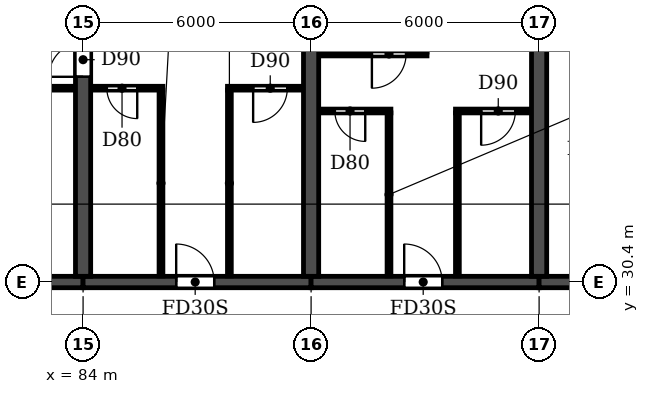
"""IFC4 building model, lengths in metres.
Left out: names, types, materials, properties, quantities, classifications, styles, units other than length and angle.
Written with IfcOpenShell. Run it as: python <this file> out.ifc"""

import sys

from ifc_helpers import new_model, si_unit, direction, frame, frame_2d, origin, place, context, subcontext, project, spatial, rectangle, extrude, element, fill, save


model = new_model("IFC4")
c1 = context("Model", 3, precision=1e-05, world=origin(), true_north=direction((0.0, 1.0)))
c2 = subcontext(c1, "Body", "Model", "MODEL_VIEW")
j1 = project(units=[si_unit("LENGTHUNIT", "METRE"), si_unit("PLANEANGLEUNIT", "RADIAN")], contexts=[c1])
p1 = place(None, origin())
s1 = spatial("IfcSite", under=j1, at=p1, CompositionType="ELEMENT")
p2 = place(p1, origin())
s2 = spatial("IfcBuilding", under=s1, at=p2, CompositionType="ELEMENT")
p3 = place(p2, frame((0.0, 0.0, 43.2)))
s3 = spatial("IfcBuildingStorey", under=s2, at=p3, CompositionType="ELEMENT", Elevation=43.2)
p4 = place(p3, frame((84.0, 30.55, 0.0), z_axis=(0.0, 0.0, 1.0), x_axis=(0.0, 1.0, 0.0)))
e1 = element("IfcWall", 1, at=p4, inside=s3, PredefinedType="SHEAR", context=c2, shape_type="SweptSolid", body=[
    extrude(rectangle(XDim=14.05, YDim=0.4, at=frame_2d((7.025, 0.0))), origin(), (0.0, 0.0, 1.0), 3.05),
])
p5 = place(p4, frame((5.25, 0.0, 0.0)))
e2 = element("IfcOpeningElement", 2, at=p5, cuts=e1, PredefinedType="OPENING", context=c2, shape_type="SweptSolid", body=[
    extrude(rectangle(XDim=0.9, YDim=2.1, at=frame_2d((0.45, 1.05))), frame((0.0, 0.21, 0.0), z_axis=(0.0, -1.0, 0.0), x_axis=(1.0, 0.0, 0.0)), (0.0, 0.0, 1.0), 0.42),
])
for number, where, z_axis, x_axis in (
    (3, (90.0, 30.55, 0.0), (0.0, 0.0, 1.0), (0.0, 1.0, 0.0)),
    (4, (96.0, 30.55, 0.0), (0.0, 0.0, 1.0), (0.0, 1.0, 0.0)),
):
    element("IfcWall", number, at=place(p3, frame(where, z_axis=z_axis, x_axis=x_axis)), inside=s3, PredefinedType="SHEAR", context=c2, shape_type="SweptSolid", body=[
        extrude(rectangle(XDim=14.05, YDim=0.4, at=frame_2d((7.025, 0.0))), origin(), (0.0, 0.0, 1.0), 3.05),
    ])
p6 = place(p3, frame((78.0, 30.4, 0.0), z_axis=(0.0, 0.0, 1.0), x_axis=(1.0, 0.0, 0.0)))
e5 = element("IfcWall", 5, at=p6, inside=s3, PredefinedType="SHEAR", context=c2, shape_type="SweptSolid", body=[
    extrude(rectangle(XDim=6.0, YDim=0.3, at=frame_2d((3.0, 0.0))), origin(), (0.0, 0.0, 1.0), 2.45),
])
p7 = place(p3, frame((84.0, 30.4, 0.0), z_axis=(0.0, 0.0, 1.0), x_axis=(1.0, 0.0, 0.0)))
e6 = element("IfcWall", 6, at=p7, inside=s3, PredefinedType="SHEAR", context=c2, shape_type="SweptSolid", body=[
    extrude(rectangle(XDim=6.0, YDim=0.3, at=frame_2d((3.0, 0.0))), origin(), (0.0, 0.0, 1.0), 2.45),
])
p8 = place(p7, frame((2.45, 0.0, 0.0)))
e7 = element("IfcOpeningElement", 7, at=p8, cuts=e6, PredefinedType="OPENING", context=c2, shape_type="SweptSolid", body=[
    extrude(rectangle(XDim=1.0, YDim=2.1, at=frame_2d((0.5, 1.05))), frame((0.0, 0.16, 0.0), z_axis=(0.0, -1.0, 0.0), x_axis=(1.0, 0.0, 0.0)), (0.0, 0.0, 1.0), 0.32),
])
p9 = place(p3, frame((90.0, 30.4, 0.0), z_axis=(0.0, 0.0, 1.0), x_axis=(1.0, 0.0, 0.0)))
e8 = element("IfcWall", 8, at=p9, inside=s3, PredefinedType="SHEAR", context=c2, shape_type="SweptSolid", body=[
    extrude(rectangle(XDim=6.0, YDim=0.3, at=frame_2d((3.0, 0.0))), origin(), (0.0, 0.0, 1.0), 2.45),
])
p10 = place(p9, frame((2.45, 0.0, 0.0)))
e9 = element("IfcOpeningElement", 9, at=p10, cuts=e8, PredefinedType="OPENING", context=c2, shape_type="SweptSolid", body=[
    extrude(rectangle(XDim=1.0, YDim=2.1, at=frame_2d((0.5, 1.05))), frame((0.0, 0.16, 0.0), z_axis=(0.0, -1.0, 0.0), x_axis=(1.0, 0.0, 0.0)), (0.0, 0.0, 1.0), 0.32),
])
p11 = place(p3, frame((96.0, 30.4, 0.0), z_axis=(0.0, 0.0, 1.0), x_axis=(1.0, 0.0, 0.0)))
e10 = element("IfcWall", 10, at=p11, inside=s3, PredefinedType="SHEAR", context=c2, shape_type="SweptSolid", body=[
    extrude(rectangle(XDim=5.8, YDim=0.3, at=frame_2d((2.9, 0.0))), origin(), (0.0, 0.0, 1.0), 2.45),
])
p12 = place(p11, frame((2.5, 0.0, 0.0)))
e11 = element("IfcOpeningElement", 11, at=p12, cuts=e10, PredefinedType="OPENING", context=c2, shape_type="SweptSolid", body=[
    extrude(rectangle(XDim=1.0, YDim=2.1, at=frame_2d((0.5, 1.05))), frame((0.0, 0.16, 0.0), z_axis=(0.0, -1.0, 0.0), x_axis=(1.0, 0.0, 0.0)), (0.0, 0.0, 1.0), 0.32),
])
p13 = place(p3, frame((90.21, 34.9, 0.0), z_axis=(0.0, 0.0, 1.0), x_axis=(1.0, 0.0, 0.0)))
e12 = element("IfcWall", 12, at=p13, inside=s3, PredefinedType="PARTITIONING", context=c2, shape_type="SweptSolid", body=[
    extrude(rectangle(XDim=1.89, YDim=0.1, at=frame_2d((0.945, 0.0))), origin(), (0.0, 0.0, 1.0), 3.05),
])
p14 = place(p13, frame((0.415, 0.0, 0.0)))
e13 = element("IfcOpeningElement", 13, at=p14, cuts=e12, PredefinedType="OPENING", context=c2, shape_type="SweptSolid", body=[
    extrude(rectangle(XDim=0.8, YDim=2.1, at=frame_2d((0.4, 1.05))), frame((0.0, 0.06, 0.0), z_axis=(0.0, -1.0, 0.0), x_axis=(1.0, 0.0, 0.0)), (0.0, 0.0, 1.0), 0.12),
])
p15 = place(p3, frame((93.8, 34.9, 0.0), z_axis=(0.0, 0.0, 1.0), x_axis=(1.0, 0.0, 0.0)))
e14 = element("IfcWall", 14, at=p15, inside=s3, PredefinedType="PARTITIONING", context=c2, shape_type="SweptSolid", body=[
    extrude(rectangle(XDim=1.99, YDim=0.1, at=frame_2d((0.995, 0.0))), origin(), (0.0, 0.0, 1.0), 3.05),
])
p16 = place(p15, frame((0.675, 0.0, 0.0)))
e15 = element("IfcOpeningElement", 15, at=p16, cuts=e14, PredefinedType="OPENING", context=c2, shape_type="SweptSolid", body=[
    extrude(rectangle(XDim=0.9, YDim=2.1, at=frame_2d((0.45, 1.05))), frame((0.0, 0.06, 0.0), z_axis=(0.0, -1.0, 0.0), x_axis=(1.0, 0.0, 0.0)), (0.0, 0.0, 1.0), 0.12),
])
p17 = place(p3, frame((81.1, 35.5, 0.0), z_axis=(0.0, 0.0, 1.0), x_axis=(1.0, 0.0, 0.0)))
e16 = element("IfcWall", 16, at=p17, inside=s3, PredefinedType="PARTITIONING", context=c2, shape_type="SweptSolid", body=[
    extrude(rectangle(XDim=2.69, YDim=0.1, at=frame_2d((1.345, 0.0))), origin(), (0.0, 0.0, 1.0), 3.05),
])
p18 = place(p17, frame((1.0, 0.0, 0.0)))
e17 = element("IfcOpeningElement", 17, at=p18, cuts=e16, PredefinedType="OPENING", context=c2, shape_type="SweptSolid", body=[
    extrude(rectangle(XDim=0.8, YDim=2.1, at=frame_2d((0.4, 1.05))), frame((0.0, 0.06, 0.0), z_axis=(0.0, -1.0, 0.0), x_axis=(1.0, 0.0, 0.0)), (0.0, 0.0, 1.0), 0.12),
])
p19 = place(p3, frame((84.21, 35.5, 0.0), z_axis=(0.0, 0.0, 1.0), x_axis=(1.0, 0.0, 0.0)))
e18 = element("IfcWall", 18, at=p19, inside=s3, PredefinedType="PARTITIONING", context=c2, shape_type="SweptSolid", body=[
    extrude(rectangle(XDim=1.89, YDim=0.1, at=frame_2d((0.945, 0.0))), origin(), (0.0, 0.0, 1.0), 3.05),
])
p20 = place(p19, frame((0.415, 0.0, 0.0)))
e19 = element("IfcOpeningElement", 19, at=p20, cuts=e18, PredefinedType="OPENING", context=c2, shape_type="SweptSolid", body=[
    extrude(rectangle(XDim=0.8, YDim=2.1, at=frame_2d((0.4, 1.05))), frame((0.0, 0.06, 0.0), z_axis=(0.0, -1.0, 0.0), x_axis=(1.0, 0.0, 0.0)), (0.0, 0.0, 1.0), 0.12),
])
p21 = place(p3, frame((87.8, 35.5, 0.0), z_axis=(0.0, 0.0, 1.0), x_axis=(1.0, 0.0, 0.0)))
e20 = element("IfcWall", 20, at=p21, inside=s3, PredefinedType="PARTITIONING", context=c2, shape_type="SweptSolid", body=[
    extrude(rectangle(XDim=1.99, YDim=0.1, at=frame_2d((0.995, 0.0))), origin(), (0.0, 0.0, 1.0), 3.05),
])
p22 = place(p21, frame((0.675, 0.0, 0.0)))
e21 = element("IfcOpeningElement", 21, at=p22, cuts=e20, PredefinedType="OPENING", context=c2, shape_type="SweptSolid", body=[
    extrude(rectangle(XDim=0.9, YDim=2.1, at=frame_2d((0.45, 1.05))), frame((0.0, 0.06, 0.0), z_axis=(0.0, -1.0, 0.0), x_axis=(1.0, 0.0, 0.0)), (0.0, 0.0, 1.0), 0.12),
])
p23 = place(p3, frame((90.21, 36.4, 0.0), z_axis=(0.0, 0.0, 1.0), x_axis=(1.0, 0.0, 0.0)))
e22 = element("IfcWall", 22, at=p23, inside=s3, PredefinedType="PARTITIONING", context=c2, shape_type="SweptSolid", body=[
    extrude(rectangle(XDim=2.84, YDim=0.1, at=frame_2d((1.42, 0.0))), origin(), (0.0, 0.0, 1.0), 3.05),
])
p24 = place(p23, frame((1.39, 0.0, 0.0)))
e23 = element("IfcOpeningElement", 23, at=p24, cuts=e22, PredefinedType="OPENING", context=c2, shape_type="SweptSolid", body=[
    extrude(rectangle(XDim=0.9, YDim=2.1, at=frame_2d((0.45, 1.05))), frame((0.0, 0.06, 0.0), z_axis=(0.0, -1.0, 0.0), x_axis=(1.0, 0.0, 0.0)), (0.0, 0.0, 1.0), 0.12),
])
for number, where, z_axis, x_axis in (
    (24, (86.05, 30.56, 0.0), (0.0, 0.0, 1.0), (0.0, 1.0, 0.0)),
    (25, (87.85, 30.56, 0.0), (0.0, 0.0, 1.0), (0.0, 1.0, 0.0)),
):
    element("IfcWall", number, at=place(p3, frame(where, z_axis=z_axis, x_axis=x_axis)), inside=s3, PredefinedType="PARTITIONING", context=c2, shape_type="SweptSolid", body=[
        extrude(rectangle(XDim=4.89, YDim=0.1, at=frame_2d((2.445, 0.0))), origin(), (0.0, 0.0, 1.0), 3.05),
    ])
for number, where, z_axis, x_axis in (
    (26, (92.05, 30.56, 0.0), (0.0, 0.0, 1.0), (0.0, 1.0, 0.0)),
    (27, (93.85, 30.56, 0.0), (0.0, 0.0, 1.0), (0.0, 1.0, 0.0)),
):
    element("IfcWall", number, at=place(p3, frame(where, z_axis=z_axis, x_axis=x_axis)), inside=s3, PredefinedType="PARTITIONING", context=c2, shape_type="SweptSolid", body=[
        extrude(rectangle(XDim=4.29, YDim=0.1, at=frame_2d((2.145, 0.0))), origin(), (0.0, 0.0, 1.0), 3.05),
    ])
p25 = place(p5, origin())
e28 = element("IfcDoor", 28, at=p25, inside=s3, OperationType="SINGLE_SWING_LEFT", PredefinedType="DOOR", context=c2, shape_type="SweptSolid", body=[
    extrude(rectangle(XDim=0.9, YDim=2.1, at=frame_2d((0.45, 1.05))), frame((0.0, 0.025, 0.0), z_axis=(0.0, -1.0, 0.0), x_axis=(1.0, 0.0, 0.0)), (0.0, 0.0, 1.0), 0.05),
])
fill(e2, e28)
p26 = place(p20, frame((0.8, 0.0, 0.0), z_axis=(0.0, 0.0, 1.0), x_axis=(-1.0, 0.0, 0.0)))
e29 = element("IfcDoor", 29, at=p26, inside=s3, OperationType="SINGLE_SWING_LEFT", PredefinedType="DOOR", context=c2, shape_type="SweptSolid", body=[
    extrude(rectangle(XDim=0.8, YDim=2.1, at=frame_2d((0.4, 1.05))), frame((0.0, 0.025, 0.0), z_axis=(0.0, -1.0, 0.0), x_axis=(1.0, 0.0, 0.0)), (0.0, 0.0, 1.0), 0.05),
])
fill(e19, e29)
p27 = place(p8, origin())
e30 = element("IfcDoor", 30, at=p27, inside=s3, OperationType="SINGLE_SWING_LEFT", PredefinedType="DOOR", context=c2, shape_type="SweptSolid", body=[
    extrude(rectangle(XDim=1.0, YDim=2.1, at=frame_2d((0.5, 1.05))), frame((0.0, 0.025, 0.0), z_axis=(0.0, -1.0, 0.0), x_axis=(1.0, 0.0, 0.0)), (0.0, 0.0, 1.0), 0.05),
])
fill(e7, e30)
p28 = place(p22, frame((0.9, 0.0, 0.0), z_axis=(0.0, 0.0, 1.0), x_axis=(-1.0, 0.0, 0.0)))
e31 = element("IfcDoor", 31, at=p28, inside=s3, OperationType="SINGLE_SWING_RIGHT", PredefinedType="DOOR", context=c2, shape_type="SweptSolid", body=[
    extrude(rectangle(XDim=0.9, YDim=2.1, at=frame_2d((0.45, 1.05))), frame((0.0, 0.025, 0.0), z_axis=(0.0, -1.0, 0.0), x_axis=(1.0, 0.0, 0.0)), (0.0, 0.0, 1.0), 0.05),
])
fill(e21, e31)
p29 = place(p14, frame((0.8, 0.0, 0.0), z_axis=(0.0, 0.0, 1.0), x_axis=(-1.0, 0.0, 0.0)))
e32 = element("IfcDoor", 32, at=p29, inside=s3, OperationType="SINGLE_SWING_LEFT", PredefinedType="DOOR", context=c2, shape_type="SweptSolid", body=[
    extrude(rectangle(XDim=0.8, YDim=2.1, at=frame_2d((0.4, 1.05))), frame((0.0, 0.025, 0.0), z_axis=(0.0, -1.0, 0.0), x_axis=(1.0, 0.0, 0.0)), (0.0, 0.0, 1.0), 0.05),
])
fill(e13, e32)
p30 = place(p24, frame((0.9, 0.0, 0.0), z_axis=(0.0, 0.0, 1.0), x_axis=(-1.0, 0.0, 0.0)))
e33 = element("IfcDoor", 33, at=p30, inside=s3, OperationType="SINGLE_SWING_RIGHT", PredefinedType="DOOR", context=c2, shape_type="SweptSolid", body=[
    extrude(rectangle(XDim=0.9, YDim=2.1, at=frame_2d((0.45, 1.05))), frame((0.0, 0.025, 0.0), z_axis=(0.0, -1.0, 0.0), x_axis=(1.0, 0.0, 0.0)), (0.0, 0.0, 1.0), 0.05),
])
fill(e23, e33)
p31 = place(p10, origin())
e34 = element("IfcDoor", 34, at=p31, inside=s3, OperationType="SINGLE_SWING_LEFT", PredefinedType="DOOR", context=c2, shape_type="SweptSolid", body=[
    extrude(rectangle(XDim=1.0, YDim=2.1, at=frame_2d((0.5, 1.05))), frame((0.0, 0.025, 0.0), z_axis=(0.0, -1.0, 0.0), x_axis=(1.0, 0.0, 0.0)), (0.0, 0.0, 1.0), 0.05),
])
fill(e9, e34)
p32 = place(p16, frame((0.9, 0.0, 0.0), z_axis=(0.0, 0.0, 1.0), x_axis=(-1.0, 0.0, 0.0)))
e35 = element("IfcDoor", 35, at=p32, inside=s3, OperationType="SINGLE_SWING_RIGHT", PredefinedType="DOOR", context=c2, shape_type="SweptSolid", body=[
    extrude(rectangle(XDim=0.9, YDim=2.1, at=frame_2d((0.45, 1.05))), frame((0.0, 0.025, 0.0), z_axis=(0.0, -1.0, 0.0), x_axis=(1.0, 0.0, 0.0)), (0.0, 0.0, 1.0), 0.05),
])
fill(e15, e35)
save(model, sys.argv[1])
